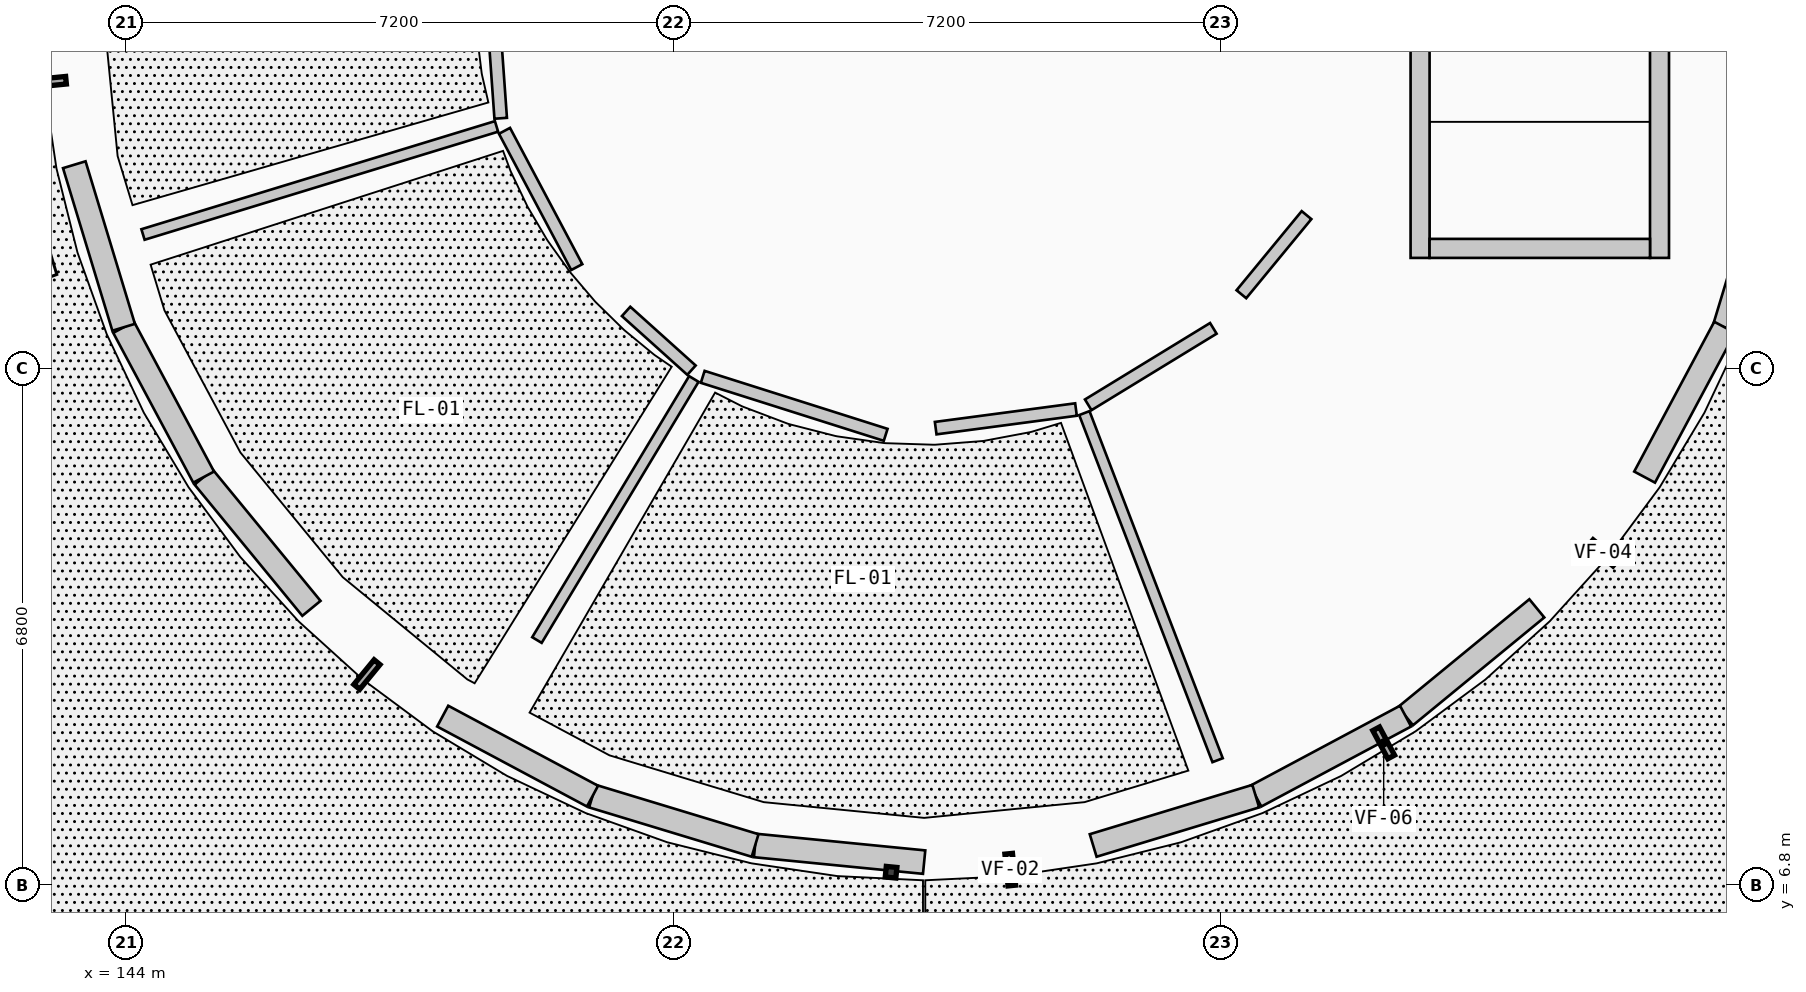
"""IFC4 building model, lengths in metres.
Left out: names, types, materials, properties, quantities, classifications, styles, units other than length and angle.
Written with IfcOpenShell. Run it as: python <this file> out.ifc"""

import sys

from ifc_helpers import new_model, si_unit, direction, frame, frame_2d, origin, origin_2d, place, context, subcontext, project, spatial, rectangle, circle, extrude, element, fill, save


model = new_model("IFC4")
c1 = context("Model", 3, precision=1e-05, world=origin(), true_north=direction((0.0, 1.0)))
c2 = subcontext(c1, "Body", "Model", "MODEL_VIEW")
j1 = project(units=[si_unit("LENGTHUNIT", "METRE"), si_unit("PLANEANGLEUNIT", "RADIAN")], contexts=[c1])
p1 = place(None, origin())
s1 = spatial("IfcSite", under=j1, at=p1, CompositionType="ELEMENT")
p2 = place(p1, origin())
s2 = spatial("IfcBuilding", under=s1, at=p2, CompositionType="ELEMENT")
p3 = place(p2, origin())
s3 = spatial("IfcBuildingStorey", under=s2, at=p3, CompositionType="ELEMENT", Elevation=0.0)
for number, where, z_axis, x_axis in (
    (1, (144.448, 14.336, 0.0), (0.0, 0.0, 1.0), (1.0, 0.0, 0.0)),
    (2, (146.807, 10.807, 0.0), (0.0, 0.0, 1.0), (1.0, 0.0, 0.0)),
    (3, (150.336, 8.448, 0.0), (0.0, 0.0, 1.0), (1.0, 0.0, 0.0)),
    (4, (154.5, 7.62, 0.0), (0.0, 0.0, 1.0), (1.0, 0.0, 0.0)),
    (5, (158.664, 8.448, 0.0), (0.0, 0.0, 1.0), (1.0, 0.0, 0.0)),
    (6, (162.193, 10.807, 0.0), (0.0, 0.0, 1.0), (1.0, 0.0, 0.0)),
    (7, (164.552, 14.336, 0.0), (0.0, 0.0, 1.0), (1.0, 0.0, 0.0)),
):
    element("IfcColumn", number, at=place(p3, frame(where, z_axis=z_axis, x_axis=x_axis)), inside=s3, PredefinedType="PILASTER", context=c2, shape_type="SweptSolid", body=[
        extrude(circle(Radius=0.275, at=origin_2d()), origin(), (0.0, 0.0, 1.0), 4.55),
    ])
for number, where, z_axis, x_axis in (
    (8, (150.399, 14.399, 0.0), (0.0, 0.0, 1.0), (1.0, 0.0, 0.0)),
    (9, (154.5, 12.7, 0.0), (0.0, 0.0, 1.0), (1.0, 0.0, 0.0)),
    (10, (158.601, 14.399, 0.0), (0.0, 0.0, 1.0), (1.0, 0.0, 0.0)),
):
    element("IfcColumn", number, at=place(p3, frame(where, z_axis=z_axis, x_axis=x_axis)), inside=s3, PredefinedType="COLUMN", context=c2, shape_type="SweptSolid", body=[
        extrude(rectangle(XDim=0.365, YDim=0.365, at=origin_2d()), origin(), (0.0, 0.0, 1.0), 4.55),
    ])
p4 = place(p3, frame((143.129, 15.068, 0.0), z_axis=(0.0, 0.0, 1.0), x_axis=(1.0, 0.0, 0.0)))
e11 = element("IfcColumn", 11, at=p4, inside=s3, PredefinedType="PILASTER", context=c2, shape_type="SweptSolid", body=[
    extrude(circle(Radius=0.275, at=origin_2d()), origin(), (0.0, 0.0, 1.0), 4.55),
])
p5 = place(p3, frame((165.681, 16.276, 0.0), z_axis=(0.0, 0.0, 1.0), x_axis=(-0.290322655883, -0.956928814218, 0.0)))
e12 = element("IfcWall", 12, at=p5, inside=s3, PredefinedType="SOLIDWALL", context=c2, shape_type="SweptSolid", body=[
    extrude(rectangle(XDim=2.235, YDim=0.31, at=frame_2d((1.118, 0.0))), origin(), (0.0, 0.0, 1.0), 3.659),
])
p6 = place(p3, frame((165.032, 14.137, 0.0), z_axis=(0.0, 0.0, 1.0), x_axis=(-0.471217561446, -0.882017012185, 0.0)))
e13 = element("IfcWall", 13, at=p6, inside=s3, PredefinedType="SOLIDWALL", context=c2, shape_type="SweptSolid", body=[
    extrude(rectangle(XDim=2.235, YDim=0.31, at=frame_2d((1.117, 0.0))), origin(), (0.0, 0.0, 1.0), 3.659),
])
p7 = place(p6, frame((0.417, 0.0, 0.0)))
e14 = element("IfcOpeningElement", 14, at=p7, cuts=e13, PredefinedType="OPENING", context=c2, shape_type="SweptSolid", body=[
    extrude(rectangle(XDim=1.4, YDim=2.3, at=frame_2d((0.7, 1.15))), frame((0.0, 0.165, 0.0), z_axis=(0.0, -1.0, 0.0), x_axis=(1.0, 0.0, 0.0)), (0.0, 0.0, 1.0), 0.33),
])
for number, where, z_axis, x_axis in (
    (15, (162.561, 10.439, 0.0), (0.0, 0.0, 1.0), (-0.773, -0.635, 0.0)),
    (16, (160.834, 9.021, 0.0), (0.0, 0.0, 1.0), (-0.882, -0.471, 0.0)),
):
    element("IfcWall", number, at=place(p3, frame(where, z_axis=z_axis, x_axis=x_axis)), inside=s3, PredefinedType="SOLIDWALL", context=c2, shape_type="SweptSolid", body=[
        extrude(rectangle(XDim=2.235, YDim=0.31, at=frame_2d((1.117, 0.0))), origin(), (0.0, 0.0, 1.0), 3.659),
    ])
p8 = place(p3, frame((158.863, 7.968, 0.0), z_axis=(0.0, 0.0, 1.0), x_axis=(-0.956928814218, -0.290322655883, 0.0)))
e17 = element("IfcWall", 17, at=p8, inside=s3, PredefinedType="SOLIDWALL", context=c2, shape_type="SweptSolid", body=[
    extrude(rectangle(XDim=2.235, YDim=0.31, at=frame_2d((1.118, 0.0))), origin(), (0.0, 0.0, 1.0), 3.659),
])
p9 = place(p3, frame((154.5, 7.1, 0.0), z_axis=(0.0, 0.0, 1.0), x_axis=(-0.995187461503, 0.097989369151, 0.0)))
e18 = element("IfcWall", 18, at=p9, inside=s3, PredefinedType="SOLIDWALL", context=c2, shape_type="SweptSolid", body=[
    extrude(rectangle(XDim=2.235, YDim=0.31, at=frame_2d((1.117, 0.0))), origin(), (0.0, 0.0, 1.0), 3.659),
])
p10 = place(p3, frame((152.276, 7.319, 0.0), z_axis=(0.0, 0.0, 1.0), x_axis=(-0.956928814218, 0.290322655883, 0.0)))
e19 = element("IfcWall", 19, at=p10, inside=s3, PredefinedType="SOLIDWALL", context=c2, shape_type="SweptSolid", body=[
    extrude(rectangle(XDim=2.235, YDim=0.31, at=frame_2d((1.118, 0.0))), origin(), (0.0, 0.0, 1.0), 3.659),
])
p11 = place(p3, frame((150.137, 7.968, 0.0), z_axis=(0.0, 0.0, 1.0), x_axis=(-0.882017012185, 0.471217561446, 0.0)))
e20 = element("IfcWall", 20, at=p11, inside=s3, PredefinedType="SOLIDWALL", context=c2, shape_type="SweptSolid", body=[
    extrude(rectangle(XDim=2.235, YDim=0.31, at=frame_2d((1.117, 0.0))), origin(), (0.0, 0.0, 1.0), 3.659),
])
p12 = place(p11, frame((0.467, 0.0, 0.0)))
e21 = element("IfcOpeningElement", 21, at=p12, cuts=e20, PredefinedType="OPENING", context=c2, shape_type="SweptSolid", body=[
    extrude(rectangle(XDim=1.3, YDim=2.25, at=frame_2d((0.65, 1.125))), frame((0.0, 0.165, 0.0), z_axis=(0.0, -1.0, 0.0), x_axis=(1.0, 0.0, 0.0)), (0.0, 0.0, 1.0), 0.33),
])
for number, where, z_axis, x_axis in (
    (22, (146.439, 10.439, 0.0), (0.0, 0.0, 1.0), (-0.635, 0.773, 0.0)),
    (23, (145.021, 12.166, 0.0), (0.0, 0.0, 1.0), (-0.471, 0.882, 0.0)),
):
    element("IfcWall", number, at=place(p3, frame(where, z_axis=z_axis, x_axis=x_axis)), inside=s3, PredefinedType="SOLIDWALL", context=c2, shape_type="SweptSolid", body=[
        extrude(rectangle(XDim=2.235, YDim=0.31, at=frame_2d((1.117, 0.0))), origin(), (0.0, 0.0, 1.0), 3.659),
    ])
p13 = place(p3, frame((143.968, 14.137, 0.0), z_axis=(0.0, 0.0, 1.0), x_axis=(-0.290322655883, 0.956928814218, 0.0)))
e24 = element("IfcWall", 24, at=p13, inside=s3, PredefinedType="SOLIDWALL", context=c2, shape_type="SweptSolid", body=[
    extrude(rectangle(XDim=2.235, YDim=0.31, at=frame_2d((1.118, 0.0))), origin(), (0.0, 0.0, 1.0), 3.659),
])
p14 = place(p3, frame((161.025, 21.95, 0.0), z_axis=(0.0, 0.0, 1.0), x_axis=(0.0, -1.0, 0.0)))
e25 = element("IfcWall", 25, at=p14, inside=s3, PredefinedType="SHEAR", context=c2, shape_type="SweptSolid", body=[
    extrude(rectangle(XDim=6.9, YDim=0.25, at=frame_2d((3.45, 0.0))), origin(), (0.0, 0.0, 1.0), 4.305),
])
p15 = place(p14, frame((0.43, 0.0, 0.0)))
e26 = element("IfcOpeningElement", 26, at=p15, cuts=e25, PredefinedType="OPENING", context=c2, shape_type="SweptSolid", body=[
    extrude(rectangle(XDim=1.1, YDim=2.15, at=frame_2d((0.55, 1.075))), frame((0.0, 0.135, 0.0), z_axis=(0.0, -1.0, 0.0), x_axis=(1.0, 0.0, 0.0)), (0.0, 0.0, 1.0), 0.27),
])
p16 = place(p3, frame((164.175, 21.95, 0.0), z_axis=(0.0, 0.0, 1.0), x_axis=(0.0, -1.0, 0.0)))
e27 = element("IfcWall", 27, at=p16, inside=s3, PredefinedType="SHEAR", context=c2, shape_type="SweptSolid", body=[
    extrude(rectangle(XDim=6.9, YDim=0.25, at=frame_2d((3.45, 0.0))), origin(), (0.0, 0.0, 1.0), 4.305),
])
p17 = place(p3, frame((161.15, 15.175, 0.0), z_axis=(0.0, 0.0, 1.0), x_axis=(1.0, 0.0, 0.0)))
e28 = element("IfcWall", 28, at=p17, inside=s3, PredefinedType="SHEAR", context=c2, shape_type="SweptSolid", body=[
    extrude(rectangle(XDim=2.9, YDim=0.25, at=frame_2d((1.45, 0.0))), origin(), (0.0, 0.0, 1.0), 4.305),
])
p18 = place(p3, frame((148.874, 16.78, 0.0), z_axis=(0.0, 0.0, 1.0), x_axis=(-0.956297390361, -0.292395795436, 0.0)))
e29 = element("IfcWall", 29, at=p18, inside=s3, PredefinedType="PARTITIONING", context=c2, shape_type="SweptSolid", body=[
    extrude(rectangle(XDim=4.864, YDim=0.145, at=frame_2d((2.432, 0.0))), origin(), (0.0, 0.0, 1.0), 3.634),
])
p19 = place(p3, frame((151.47, 13.457, 0.0), z_axis=(0.0, 0.0, 1.0), x_axis=(-0.515033199945, -0.857170229858, 0.0)))
e30 = element("IfcWall", 30, at=p19, inside=s3, PredefinedType="PARTITIONING", context=c2, shape_type="SweptSolid", body=[
    extrude(rectangle(XDim=4.007, YDim=0.145, at=frame_2d((2.004, 0.0))), origin(), (0.0, 0.0, 1.0), 3.634),
])
p20 = place(p3, frame((156.608, 13.008, 0.0), z_axis=(0.0, 0.0, 1.0), x_axis=(0.358370363431, -0.93357949989, 0.0)))
e31 = element("IfcWall", 31, at=p20, inside=s3, PredefinedType="PARTITIONING", context=c2, shape_type="SweptSolid", body=[
    extrude(rectangle(XDim=4.892, YDim=0.145, at=frame_2d((2.446, 0.0))), origin(), (0.0, 0.0, 1.0), 3.634),
])
p21 = place(p3, frame((148.824, 18.36, 0.0), z_axis=(0.0, 0.0, 1.0), x_axis=(0.071082579823, -0.997470434071, 0.0)))
e32 = element("IfcWall", 32, at=p21, inside=s3, PredefinedType="PARTITIONING", context=c2, shape_type="SweptSolid", body=[
    extrude(rectangle(XDim=1.477, YDim=0.165, at=frame_2d((0.738, 0.0))), origin(), (0.0, 0.0, 1.0), 3.634),
])
p22 = place(p3, frame((148.979, 16.722, 0.0), z_axis=(0.0, 0.0, 1.0), x_axis=(0.468545306674, -0.883439469117, 0.0)))
e33 = element("IfcWall", 33, at=p22, inside=s3, PredefinedType="PARTITIONING", context=c2, shape_type="SweptSolid", body=[
    extrude(rectangle(XDim=2.03, YDim=0.165, at=frame_2d((1.015, 0.0))), origin(), (0.0, 0.0, 1.0), 3.634),
])
p23 = place(p22, frame((0.505, 0.0, 0.0)))
e34 = element("IfcOpeningElement", 34, at=p23, cuts=e33, PredefinedType="OPENING", context=c2, shape_type="SweptSolid", body=[
    extrude(rectangle(XDim=1.02, YDim=2.2, at=frame_2d((0.51, 1.1))), frame((0.0, 0.093, 0.0), z_axis=(0.0, -1.0, 0.0), x_axis=(1.0, 0.0, 0.0)), (0.0, 0.0, 1.0), 0.185),
])
p24 = place(p3, frame((150.579, 14.346, 0.0), z_axis=(0.0, 0.0, 1.0), x_axis=(0.743692994732, -0.668521300773, 0.0)))
e35 = element("IfcWall", 35, at=p24, inside=s3, PredefinedType="PARTITIONING", context=c2, shape_type="SweptSolid", body=[
    extrude(rectangle(XDim=1.156, YDim=0.165, at=frame_2d((0.578, 0.0))), origin(), (0.0, 0.0, 1.0), 3.634),
])
p25 = place(p3, frame((151.587, 13.485, 0.0), z_axis=(0.0, 0.0, 1.0), x_axis=(0.953231317115, -0.302241717953, 0.0)))
e36 = element("IfcWall", 36, at=p25, inside=s3, PredefinedType="PARTITIONING", context=c2, shape_type="SweptSolid", body=[
    extrude(rectangle(XDim=2.525, YDim=0.165, at=frame_2d((1.263, 0.0))), origin(), (0.0, 0.0, 1.0), 3.634),
])
p26 = place(p25, frame((0.708, 0.0, 0.0)))
e37 = element("IfcOpeningElement", 37, at=p26, cuts=e36, PredefinedType="OPENING", context=c2, shape_type="SweptSolid", body=[
    extrude(rectangle(XDim=1.11, YDim=2.25, at=frame_2d((0.555, 1.125))), frame((0.0, 0.093, 0.0), z_axis=(0.0, -1.0, 0.0), x_axis=(1.0, 0.0, 0.0)), (0.0, 0.0, 1.0), 0.185),
])
p27 = place(p3, frame((154.652, 12.81, 0.0), z_axis=(0.0, 0.0, 1.0), x_axis=(0.991315849542, 0.13150241993, 0.0)))
e38 = element("IfcWall", 38, at=p27, inside=s3, PredefinedType="PARTITIONING", context=c2, shape_type="SweptSolid", body=[
    extrude(rectangle(XDim=1.862, YDim=0.165, at=frame_2d((0.931, 0.0))), origin(), (0.0, 0.0, 1.0), 3.634),
])
p28 = place(p3, frame((156.659, 13.117, 0.0), z_axis=(0.0, 0.0, 1.0), x_axis=(0.853231776627, 0.521531912115, 0.0)))
e39 = element("IfcWall", 39, at=p28, inside=s3, PredefinedType="PARTITIONING", context=c2, shape_type="SweptSolid", body=[
    extrude(rectangle(XDim=1.929, YDim=0.165, at=frame_2d((0.965, 0.0))), origin(), (0.0, 0.0, 1.0), 3.634),
])
p29 = place(p28, frame((0.455, 0.0, 0.0)))
e40 = element("IfcOpeningElement", 40, at=p29, cuts=e39, PredefinedType="OPENING", context=c2, shape_type="SweptSolid", body=[
    extrude(rectangle(XDim=1.02, YDim=2.2, at=frame_2d((0.51, 1.1))), frame((0.0, 0.093, 0.0), z_axis=(0.0, -1.0, 0.0), x_axis=(1.0, 0.0, 0.0)), (0.0, 0.0, 1.0), 0.185),
])
p30 = place(p3, frame((158.674, 14.572, 0.0), z_axis=(0.0, 0.0, 1.0), x_axis=(0.635542225464, 0.772066110934, 0.0)))
e41 = element("IfcWall", 41, at=p30, inside=s3, PredefinedType="PARTITIONING", context=c2, shape_type="SweptSolid", body=[
    extrude(rectangle(XDim=1.348, YDim=0.165, at=frame_2d((0.674, 0.0))), origin(), (0.0, 0.0, 1.0), 3.634),
])
p31 = place(p7, origin())
e42 = element("IfcDoor", 42, at=p31, inside=s3, OperationType="SINGLE_SWING_LEFT", PredefinedType="DOOR", context=c2, shape_type="SweptSolid", body=[
    extrude(rectangle(XDim=1.4, YDim=2.3, at=frame_2d((0.7, 1.15))), frame((0.0, 0.025, 0.0), z_axis=(0.0, -1.0, 0.0), x_axis=(1.0, 0.0, 0.0)), (0.0, 0.0, 1.0), 0.05),
])
fill(e14, e42)
p32 = place(p12, origin())
e43 = element("IfcDoor", 43, at=p32, inside=s3, OperationType="SINGLE_SWING_RIGHT", PredefinedType="DOOR", context=c2, shape_type="SweptSolid", body=[
    extrude(rectangle(XDim=1.3, YDim=2.25, at=frame_2d((0.65, 1.125))), frame((0.0, 0.025, 0.0), z_axis=(0.0, -1.0, 0.0), x_axis=(1.0, 0.0, 0.0)), (0.0, 0.0, 1.0), 0.05),
])
fill(e21, e43)
p33 = place(p23, origin())
e44 = element("IfcDoor", 44, at=p33, inside=s3, OperationType="SINGLE_SWING_RIGHT", PredefinedType="DOOR", context=c2, shape_type="SweptSolid", body=[
    extrude(rectangle(XDim=1.02, YDim=2.2, at=frame_2d((0.51, 1.1))), frame((0.0, 0.025, 0.0), z_axis=(0.0, -1.0, 0.0), x_axis=(1.0, 0.0, 0.0)), (0.0, 0.0, 1.0), 0.05),
])
fill(e34, e44)
p34 = place(p26, origin())
e45 = element("IfcDoor", 45, at=p34, inside=s3, OperationType="SINGLE_SWING_LEFT", PredefinedType="DOOR", context=c2, shape_type="SweptSolid", body=[
    extrude(rectangle(XDim=1.11, YDim=2.25, at=frame_2d((0.555, 1.125))), frame((0.0, 0.025, 0.0), z_axis=(0.0, -1.0, 0.0), x_axis=(1.0, 0.0, 0.0)), (0.0, 0.0, 1.0), 0.05),
])
fill(e37, e45)
p35 = place(p29, origin())
e46 = element("IfcDoor", 46, at=p35, inside=s3, OperationType="SINGLE_SWING_RIGHT", PredefinedType="DOOR", context=c2, shape_type="SweptSolid", body=[
    extrude(rectangle(XDim=1.02, YDim=2.2, at=frame_2d((0.51, 1.1))), frame((0.0, 0.025, 0.0), z_axis=(0.0, -1.0, 0.0), x_axis=(1.0, 0.0, 0.0)), (0.0, 0.0, 1.0), 0.05),
])
fill(e40, e46)
save(model, sys.argv[1])
